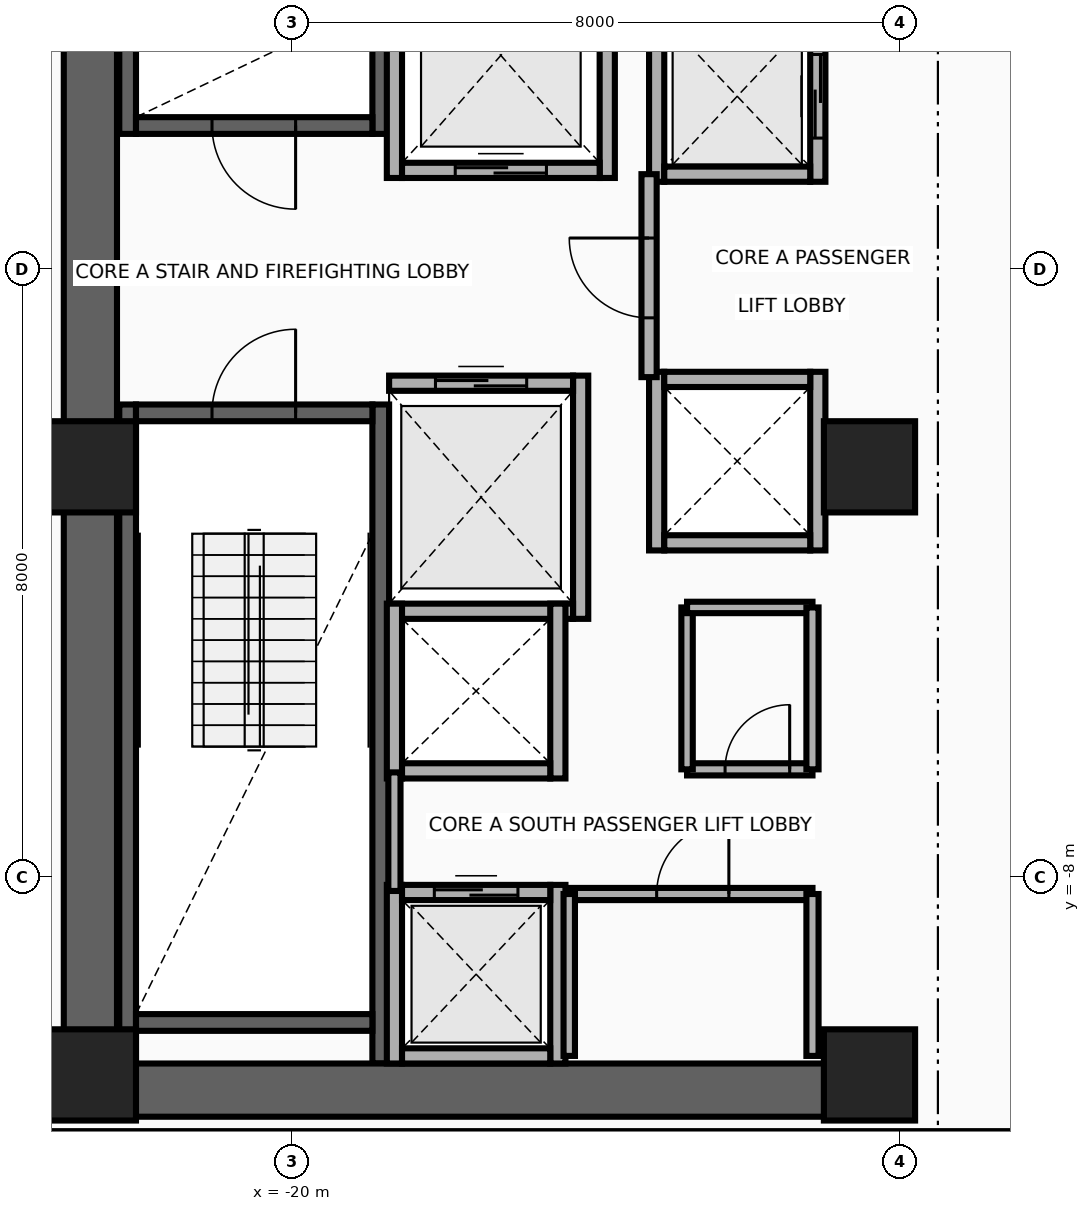
"""IFC4 building model, lengths in metres.
Left out: names, types, materials, properties, quantities, classifications, styles, units other than length and angle.
Written with IfcOpenShell. Run it as: python <this file> out.ifc"""

import sys

from ifc_helpers import new_model, si_unit, direction, frame, frame_2d, origin, origin_2d, place, context, subcontext, project, spatial, rectangle, extrude, source, transform, mapped, element, fill, save


model = new_model("IFC4")
c1 = context("Model", 3, precision=1e-05, world=origin(), true_north=direction((0.0, 1.0)))
c2 = subcontext(c1, "Body", "Model", "MODEL_VIEW")
j1 = project(units=[si_unit("LENGTHUNIT", "METRE"), si_unit("PLANEANGLEUNIT", "RADIAN")], contexts=[c1])
p1 = place(None, origin())
s1 = spatial("IfcSite", under=j1, at=p1, CompositionType="ELEMENT")
p2 = place(p1, origin())
s2 = spatial("IfcBuilding", under=s1, at=p2, CompositionType="ELEMENT")
p3 = place(p2, frame((0.0, 0.0, 150.1)))
s3 = spatial("IfcBuildingStorey", under=s2, at=p3, CompositionType="ELEMENT", Elevation=150.1)
for number, where, z_axis, x_axis in (
    (1, (-22.16, 1.78, 0.0), (0.0, 0.0, 1.0), (0.0, 1.0, 0.0)),
    (2, (-18.83, 1.78, 0.0), (0.0, 0.0, 1.0), (0.0, 1.0, 0.0)),
):
    element("IfcWall", number, at=place(p3, frame(where, z_axis=z_axis, x_axis=x_axis)), inside=s3, PredefinedType="SHEAR", context=c2, shape_type="SweptSolid", body=[
        extrude(rectangle(XDim=8.67, YDim=0.22, at=frame_2d((4.335, 0.0))), origin(), (0.0, 0.0, 1.0), 3.46),
    ])
p4 = place(p3, frame((-22.05, 1.89, 0.0), z_axis=(0.0, 0.0, 1.0), x_axis=(1.0, 0.0, 0.0)))
e3 = element("IfcWall", 3, at=p4, inside=s3, PredefinedType="SHEAR", context=c2, shape_type="SweptSolid", body=[
    extrude(rectangle(XDim=3.11, YDim=0.22, at=frame_2d((1.555, 0.0))), origin(), (0.0, 0.0, 1.0), 3.46),
])
p5 = place(p4, frame((1.0, 0.0, 0.0)))
e4 = element("IfcOpeningElement", 4, at=p5, cuts=e3, PredefinedType="OPENING", context=c2, shape_type="SweptSolid", body=[
    extrude(rectangle(XDim=1.1, YDim=2.15, at=frame_2d((0.55, 1.075))), frame((0.0, 0.125, 0.0), z_axis=(0.0, -1.0, 0.0), x_axis=(1.0, 0.0, 0.0)), (0.0, 0.0, 1.0), 0.25),
])
for number, where, z_axis, x_axis in (
    (5, (-22.16, -10.45, 0.0), (0.0, 0.0, 1.0), (0.0, 1.0, 0.0)),
    (6, (-18.83, -10.45, 0.0), (0.0, 0.0, 1.0), (0.0, 1.0, 0.0)),
):
    element("IfcWall", number, at=place(p3, frame(where, z_axis=z_axis, x_axis=x_axis)), inside=s3, PredefinedType="SHEAR", context=c2, shape_type="SweptSolid", body=[
        extrude(rectangle(XDim=8.67, YDim=0.22, at=frame_2d((4.335, 0.0))), origin(), (0.0, 0.0, 1.0), 3.46),
    ])
p6 = place(p3, frame((-22.05, -9.91, 0.0), z_axis=(0.0, 0.0, 1.0), x_axis=(1.0, 0.0, 0.0)))
e7 = element("IfcWall", 7, at=p6, inside=s3, PredefinedType="SHEAR", context=c2, shape_type="SweptSolid", body=[
    extrude(rectangle(XDim=3.11, YDim=0.22, at=frame_2d((1.555, 0.0))), origin(), (0.0, 0.0, 1.0), 3.46),
])
p7 = place(p3, frame((-22.05, -1.89, 0.0), z_axis=(0.0, 0.0, 1.0), x_axis=(1.0, 0.0, 0.0)))
e8 = element("IfcWall", 8, at=p7, inside=s3, PredefinedType="SHEAR", context=c2, shape_type="SweptSolid", body=[
    extrude(rectangle(XDim=3.11, YDim=0.22, at=frame_2d((1.555, 0.0))), origin(), (0.0, 0.0, 1.0), 3.46),
])
p8 = place(p7, frame((1.0, 0.0, 0.0)))
e9 = element("IfcOpeningElement", 9, at=p8, cuts=e8, PredefinedType="OPENING", context=c2, shape_type="SweptSolid", body=[
    extrude(rectangle(XDim=1.1, YDim=2.15, at=frame_2d((0.55, 1.075))), frame((0.0, 0.125, 0.0), z_axis=(0.0, -1.0, 0.0), x_axis=(1.0, 0.0, 0.0)), (0.0, 0.0, 1.0), 0.25),
])
p9 = place(p3, frame((-22.65, -11.15, 0.0), z_axis=(0.0, 0.0, 1.0), x_axis=(0.0, 1.0, 0.0)))
e10 = element("IfcWall", 10, at=p9, inside=s3, PredefinedType="SHEAR", context=c2, shape_type="SweptSolid", body=[
    extrude(rectangle(XDim=22.3, YDim=0.7, at=frame_2d((11.15, 0.0))), origin(), (0.0, 0.0, 1.0), 3.46),
])
p10 = place(p3, frame((-22.65, -10.8, 0.0), z_axis=(0.0, 0.0, 1.0), x_axis=(1.0, 0.0, 0.0)))
e11 = element("IfcWall", 11, at=p10, inside=s3, PredefinedType="SHEAR", context=c2, shape_type="SweptSolid", body=[
    extrude(rectangle(XDim=10.25, YDim=0.7, at=frame_2d((5.125, 0.0))), origin(), (0.0, 0.0, 1.0), 3.46),
])
m1 = source(origin(), c2, "Body", "SweptSolid", [
    extrude(rectangle(XDim=1.2, YDim=1.2, at=origin_2d()), origin(), (0.0, 0.0, 1.0), 3.7),
])
for number, where, z_axis, x_axis in (
    (12, (-22.65, -10.6, 0.0), (0.0, 0.0, 1.0), (1.0, 0.0, 0.0)),
    (13, (-12.4, -10.6, 0.0), (0.0, 0.0, 1.0), (1.0, 0.0, 0.0)),
    (14, (-22.65, -2.6, 0.0), (0.0, 0.0, 1.0), (1.0, 0.0, 0.0)),
    (15, (-12.4, -2.6, 0.0), (0.0, 0.0, 1.0), (1.0, 0.0, 0.0)),
):
    element("IfcColumn", number, at=place(p3, frame(where, z_axis=z_axis, x_axis=x_axis)), inside=s3, PredefinedType="COLUMN", context=c2, shape_type="MappedRepresentation", body=[
        mapped(m1, transform((0.0, 0.0, 0.0), x_axis=(1.0, 0.0, 0.0), y_axis=(0.0, 1.0, 0.0), z_axis=(0.0, 0.0, 1.0), scale=1.0)),
    ])
for number, where, z_axis, x_axis in (
    (16, (-18.65, 1.2, 0.0), (0.0, 0.0, 1.0), (0.0, 1.0, 0.0)),
    (17, (-15.85, 1.2, 0.0), (0.0, 0.0, 1.0), (0.0, 1.0, 0.0)),
):
    element("IfcWall", number, at=place(p3, frame(where, z_axis=z_axis, x_axis=x_axis)), inside=s3, PredefinedType="MOVABLE", context=c2, shape_type="SweptSolid", body=[
        extrude(rectangle(XDim=3.225, YDim=0.2, at=frame_2d((1.613, 0.0))), origin(), (0.0, 0.0, 1.0), 3.46),
    ])
p11 = place(p3, frame((-18.55, 1.3, 0.0), z_axis=(0.0, 0.0, 1.0), x_axis=(1.0, 0.0, 0.0)))
e18 = element("IfcWall", 18, at=p11, inside=s3, PredefinedType="MOVABLE", context=c2, shape_type="SweptSolid", body=[
    extrude(rectangle(XDim=2.6, YDim=0.2, at=frame_2d((1.3, 0.0))), origin(), (0.0, 0.0, 1.0), 3.46),
])
p12 = place(p11, frame((0.7, 0.0, 0.0)))
e19 = element("IfcOpeningElement", 19, at=p12, cuts=e18, PredefinedType="OPENING", context=c2, shape_type="SweptSolid", body=[
    extrude(rectangle(XDim=1.2, YDim=2.1, at=frame_2d((0.6, 1.05))), frame((0.0, 0.115, 0.0), z_axis=(0.0, -1.0, 0.0), x_axis=(1.0, 0.0, 0.0)), (0.0, 0.0, 1.0), 0.23),
])
p13 = place(p3, frame((-16.2, -4.6, 0.0), z_axis=(0.0, 0.0, 1.0), x_axis=(0.0, 1.0, 0.0)))
e20 = element("IfcWall", 20, at=p13, inside=s3, PredefinedType="MOVABLE", context=c2, shape_type="SweptSolid", body=[
    extrude(rectangle(XDim=3.2, YDim=0.2, at=frame_2d((1.6, 0.0))), origin(), (0.0, 0.0, 1.0), 3.46),
])
p14 = place(p3, frame((-18.72, -4.5, 0.0), z_axis=(0.0, 0.0, 1.0), x_axis=(1.0, 0.0, 0.0)))
e21 = element("IfcWall", 21, at=p14, inside=s3, PredefinedType="MOVABLE", context=c2, shape_type="SweptSolid", body=[
    extrude(rectangle(XDim=2.42, YDim=0.2, at=frame_2d((1.21, 0.0))), origin(), (0.0, 0.0, 1.0), 3.46),
])
p15 = place(p3, frame((-18.72, -1.5, 0.0), z_axis=(0.0, 0.0, 1.0), x_axis=(1.0, 0.0, 0.0)))
e22 = element("IfcWall", 22, at=p15, inside=s3, PredefinedType="MOVABLE", context=c2, shape_type="SweptSolid", body=[
    extrude(rectangle(XDim=2.42, YDim=0.2, at=frame_2d((1.21, 0.0))), origin(), (0.0, 0.0, 1.0), 3.46),
])
p16 = place(p15, frame((0.61, 0.0, 0.0)))
e23 = element("IfcOpeningElement", 23, at=p16, cuts=e22, PredefinedType="OPENING", context=c2, shape_type="SweptSolid", body=[
    extrude(rectangle(XDim=1.2, YDim=2.1, at=frame_2d((0.6, 1.05))), frame((0.0, 0.115, 0.0), z_axis=(0.0, -1.0, 0.0), x_axis=(1.0, 0.0, 0.0)), (0.0, 0.0, 1.0), 0.23),
])
for number, where, z_axis, x_axis in (
    (24, (-18.65, -10.45, 0.0), (0.0, 0.0, 1.0), (0.0, 1.0, 0.0)),
    (25, (-16.5, -10.45, 0.0), (0.0, 0.0, 1.0), (0.0, 1.0, 0.0)),
):
    element("IfcWall", number, at=place(p3, frame(where, z_axis=z_axis, x_axis=x_axis)), inside=s3, PredefinedType="MOVABLE", context=c2, shape_type="SweptSolid", body=[
        extrude(rectangle(XDim=2.35, YDim=0.2, at=frame_2d((1.175, 0.0))), origin(), (0.0, 0.0, 1.0), 2.666),
    ])
p17 = place(p3, frame((-18.55, -10.35, 0.0), z_axis=(0.0, 0.0, 1.0), x_axis=(1.0, 0.0, 0.0)))
e26 = element("IfcWall", 26, at=p17, inside=s3, PredefinedType="MOVABLE", context=c2, shape_type="SweptSolid", body=[
    extrude(rectangle(XDim=1.95, YDim=0.2, at=frame_2d((0.975, 0.0))), origin(), (0.0, 0.0, 1.0), 2.666),
])
p18 = place(p3, frame((-18.55, -8.2, 0.0), z_axis=(0.0, 0.0, 1.0), x_axis=(1.0, 0.0, 0.0)))
e27 = element("IfcWall", 27, at=p18, inside=s3, PredefinedType="MOVABLE", context=c2, shape_type="SweptSolid", body=[
    extrude(rectangle(XDim=1.95, YDim=0.2, at=frame_2d((0.975, 0.0))), origin(), (0.0, 0.0, 1.0), 3.46),
])
p19 = place(p18, frame((0.425, 0.0, 0.0)))
e28 = element("IfcOpeningElement", 28, at=p19, cuts=e27, PredefinedType="OPENING", context=c2, shape_type="SweptSolid", body=[
    extrude(rectangle(XDim=1.1, YDim=2.1, at=frame_2d((0.55, 1.05))), frame((0.0, 0.115, 0.0), z_axis=(0.0, -1.0, 0.0), x_axis=(1.0, 0.0, 0.0)), (0.0, 0.0, 1.0), 0.23),
])
p20 = place(p3, frame((-15.2, 1.15, 0.0), z_axis=(0.0, 0.0, 1.0), x_axis=(0.0, 1.0, 0.0)))
e29 = element("IfcWall", 29, at=p20, inside=s3, PredefinedType="MOVABLE", context=c2, shape_type="SweptSolid", body=[
    extrude(rectangle(XDim=2.25, YDim=0.2, at=frame_2d((1.125, 0.0))), origin(), (0.0, 0.0, 1.0), 3.46),
])
p21 = place(p3, frame((-13.08, 1.15, 0.0), z_axis=(0.0, 0.0, 1.0), x_axis=(0.0, 1.0, 0.0)))
e30 = element("IfcWall", 30, at=p21, inside=s3, PredefinedType="MOVABLE", context=c2, shape_type="SweptSolid", body=[
    extrude(rectangle(XDim=2.25, YDim=0.2, at=frame_2d((1.125, 0.0))), origin(), (0.0, 0.0, 1.0), 3.46),
])
p22 = place(p21, frame((0.575, 0.0, 0.0)))
e31 = element("IfcOpeningElement", 31, at=p22, cuts=e30, PredefinedType="OPENING", context=c2, shape_type="SweptSolid", body=[
    extrude(rectangle(XDim=1.1, YDim=2.1, at=frame_2d((0.55, 1.05))), frame((0.0, 0.115, 0.0), z_axis=(0.0, -1.0, 0.0), x_axis=(1.0, 0.0, 0.0)), (0.0, 0.0, 1.0), 0.23),
])
p23 = place(p3, frame((-15.1, 1.25, 0.0), z_axis=(0.0, 0.0, 1.0), x_axis=(1.0, 0.0, 0.0)))
e32 = element("IfcWall", 32, at=p23, inside=s3, PredefinedType="MOVABLE", context=c2, shape_type="SweptSolid", body=[
    extrude(rectangle(XDim=1.92, YDim=0.2, at=frame_2d((0.96, 0.0))), origin(), (0.0, 0.0, 1.0), 3.46),
])
for number, where, z_axis, x_axis in (
    (33, (-18.65, -6.7, 0.0), (0.0, 0.0, 1.0), (0.0, 1.0, 0.0)),
    (34, (-16.5, -6.7, 0.0), (0.0, 0.0, 1.0), (0.0, 1.0, 0.0)),
):
    element("IfcWall", number, at=place(p3, frame(where, z_axis=z_axis, x_axis=x_axis)), inside=s3, PredefinedType="MOVABLE", context=c2, shape_type="SweptSolid", body=[
        extrude(rectangle(XDim=2.3, YDim=0.2, at=frame_2d((1.15, 0.0))), origin(), (0.0, 0.0, 1.0), 3.46),
    ])
p24 = place(p3, frame((-18.55, -6.6, 0.0), z_axis=(0.0, 0.0, 1.0), x_axis=(1.0, 0.0, 0.0)))
e35 = element("IfcWall", 35, at=p24, inside=s3, PredefinedType="MOVABLE", context=c2, shape_type="SweptSolid", body=[
    extrude(rectangle(XDim=1.95, YDim=0.2, at=frame_2d((0.975, 0.0))), origin(), (0.0, 0.0, 1.0), 3.46),
])
for number, where, z_axis, x_axis in (
    (36, (-15.2, -3.7, 0.0), (0.0, 0.0, 1.0), (0.0, 1.0, 0.0)),
    (37, (-13.08, -3.7, 0.0), (0.0, 0.0, 1.0), (0.0, 1.0, 0.0)),
):
    element("IfcWall", number, at=place(p3, frame(where, z_axis=z_axis, x_axis=x_axis)), inside=s3, PredefinedType="MOVABLE", context=c2, shape_type="SweptSolid", body=[
        extrude(rectangle(XDim=2.35, YDim=0.2, at=frame_2d((1.175, 0.0))), origin(), (0.0, 0.0, 1.0), 3.46),
    ])
for number, where, z_axis, x_axis in (
    (38, (-15.1, -3.6, 0.0), (0.0, 0.0, 1.0), (1.0, 0.0, 0.0)),
    (39, (-15.1, -1.45, 0.0), (0.0, 0.0, 1.0), (1.0, 0.0, 0.0)),
):
    element("IfcWall", number, at=place(p3, frame(where, z_axis=z_axis, x_axis=x_axis)), inside=s3, PredefinedType="MOVABLE", context=c2, shape_type="SweptSolid", body=[
        extrude(rectangle(XDim=1.92, YDim=0.2, at=frame_2d((0.96, 0.0))), origin(), (0.0, 0.0, 1.0), 3.46),
    ])
p25 = place(p3, frame((-15.3, -1.42, 0.0), z_axis=(0.0, 0.0, 1.0), x_axis=(0.0, 1.0, 0.0)))
e40 = element("IfcWall", 40, at=p25, inside=s3, PredefinedType="PARTITIONING", context=c2, shape_type="SweptSolid", body=[
    extrude(rectangle(XDim=2.67, YDim=0.2, at=frame_2d((1.335, 0.0))), origin(), (0.0, 0.0, 1.0), 3.46),
])
p26 = place(p25, frame((0.78, 0.0, 0.0)))
e41 = element("IfcOpeningElement", 41, at=p26, cuts=e40, PredefinedType="OPENING", context=c2, shape_type="SweptSolid", body=[
    extrude(rectangle(XDim=1.05, YDim=2.15, at=frame_2d((0.525, 1.075))), frame((0.0, 0.115, 0.0), z_axis=(0.0, -1.0, 0.0), x_axis=(1.0, 0.0, 0.0)), (0.0, 0.0, 1.0), 0.23),
])
p27 = place(p3, frame((-18.65, -8.18, 0.0), z_axis=(0.0, 0.0, 1.0), x_axis=(0.0, 1.0, 0.0)))
e42 = element("IfcWall", 42, at=p27, inside=s3, PredefinedType="PARTITIONING", context=c2, shape_type="SweptSolid", body=[
    extrude(rectangle(XDim=1.56, YDim=0.16, at=frame_2d((0.78, 0.0))), origin(), (0.0, 0.0, 1.0), 3.46),
])
p28 = place(p3, frame((-16.35, -8.22, 0.0), z_axis=(0.0, 0.0, 1.0), x_axis=(1.0, 0.0, 0.0)))
e43 = element("IfcWall", 43, at=p28, inside=s3, PredefinedType="PARTITIONING", context=c2, shape_type="SweptSolid", body=[
    extrude(rectangle(XDim=3.2, YDim=0.16, at=frame_2d((1.6, 0.0))), origin(), (0.0, 0.0, 1.0), 3.46),
])
p29 = place(p28, frame((1.15, 0.0, 0.0)))
e44 = element("IfcOpeningElement", 44, at=p29, cuts=e43, PredefinedType="OPENING", context=c2, shape_type="SweptSolid", body=[
    extrude(rectangle(XDim=0.95, YDim=2.15, at=frame_2d((0.475, 1.075))), frame((0.0, 0.095, 0.0), z_axis=(0.0, -1.0, 0.0), x_axis=(1.0, 0.0, 0.0)), (0.0, 0.0, 1.0), 0.19),
])
p30 = place(p3, frame((-16.35, -10.35, 0.0), z_axis=(0.0, 0.0, 1.0), x_axis=(0.0, 1.0, 0.0)))
e45 = element("IfcWall", 45, at=p30, inside=s3, PredefinedType="PARTITIONING", context=c2, shape_type="SweptSolid", body=[
    extrude(rectangle(XDim=2.13, YDim=0.15, at=frame_2d((1.065, 0.0))), origin(), (0.0, 0.0, 1.0), 3.46),
])
p31 = place(p3, frame((-13.15, -10.35, 0.0), z_axis=(0.0, 0.0, 1.0), x_axis=(0.0, 1.0, 0.0)))
e46 = element("IfcWall", 46, at=p31, inside=s3, PredefinedType="PARTITIONING", context=c2, shape_type="SweptSolid", body=[
    extrude(rectangle(XDim=2.13, YDim=0.16, at=frame_2d((1.065, 0.0))), origin(), (0.0, 0.0, 1.0), 3.46),
])
p32 = place(p3, frame((-14.8, -6.58, 0.0), z_axis=(0.0, 0.0, 1.0), x_axis=(1.0, 0.0, 0.0)))
e47 = element("IfcWall", 47, at=p32, inside=s3, PredefinedType="PARTITIONING", context=c2, shape_type="SweptSolid", body=[
    extrude(rectangle(XDim=1.65, YDim=0.16, at=frame_2d((0.825, 0.0))), origin(), (0.0, 0.0, 1.0), 3.46),
])
p33 = place(p32, frame((0.5, 0.0, 0.0)))
e48 = element("IfcOpeningElement", 48, at=p33, cuts=e47, PredefinedType="OPENING", context=c2, shape_type="SweptSolid", body=[
    extrude(rectangle(XDim=0.85, YDim=2.05, at=frame_2d((0.425, 1.025))), frame((0.0, 0.095, 0.0), z_axis=(0.0, -1.0, 0.0), x_axis=(1.0, 0.0, 0.0)), (0.0, 0.0, 1.0), 0.19),
])
p34 = place(p3, frame((-14.8, -6.58, 0.0), z_axis=(0.0, 0.0, 1.0), x_axis=(0.0, 1.0, 0.0)))
e49 = element("IfcWall", 49, at=p34, inside=s3, PredefinedType="PARTITIONING", context=c2, shape_type="SweptSolid", body=[
    extrude(rectangle(XDim=2.13, YDim=0.15, at=frame_2d((1.065, 0.0))), origin(), (0.0, 0.0, 1.0), 3.46),
])
p35 = place(p3, frame((-14.8, -4.45, 0.0), z_axis=(0.0, 0.0, 1.0), x_axis=(1.0, 0.0, 0.0)))
e50 = element("IfcWall", 50, at=p35, inside=s3, PredefinedType="PARTITIONING", context=c2, shape_type="SweptSolid", body=[
    extrude(rectangle(XDim=1.65, YDim=0.15, at=frame_2d((0.825, 0.0))), origin(), (0.0, 0.0, 1.0), 3.46),
])
p36 = place(p3, frame((-13.15, -6.58, 0.0), z_axis=(0.0, 0.0, 1.0), x_axis=(0.0, 1.0, 0.0)))
e51 = element("IfcWall", 51, at=p36, inside=s3, PredefinedType="PARTITIONING", context=c2, shape_type="SweptSolid", body=[
    extrude(rectangle(XDim=2.13, YDim=0.16, at=frame_2d((1.065, 0.0))), origin(), (0.0, 0.0, 1.0), 3.46),
])
p37 = place(p3, frame((-23.45, -11.42, 0.0), z_axis=(0.0, 0.0, 1.0), x_axis=(1.0, 0.0, 0.0)))
e52 = element("IfcWall", 52, at=p37, inside=s3, PredefinedType="PARTITIONING", context=c2, shape_type="SweptSolid", body=[
    extrude(rectangle(XDim=13.84, YDim=0.16, at=frame_2d((6.92, 0.0))), origin(), (0.0, 0.0, 1.0), 2.834),
])
p38 = place(p12, origin())
e53 = element("IfcDoor", 53, at=p38, inside=s3, OperationType="DOUBLE_DOOR_SLIDING", PredefinedType="DOOR", context=c2, shape_type="SweptSolid", body=[
    extrude(rectangle(XDim=1.2, YDim=2.1, at=frame_2d((0.6, 1.05))), frame((0.0, 0.025, 0.0), z_axis=(0.0, -1.0, 0.0), x_axis=(1.0, 0.0, 0.0)), (0.0, 0.0, 1.0), 0.05),
])
fill(e19, e53)
p39 = place(p16, origin())
e54 = element("IfcDoor", 54, at=p39, inside=s3, OperationType="DOUBLE_DOOR_SLIDING", PredefinedType="DOOR", context=c2, shape_type="SweptSolid", body=[
    extrude(rectangle(XDim=1.2, YDim=2.1, at=frame_2d((0.6, 1.05))), frame((0.0, 0.025, 0.0), z_axis=(0.0, -1.0, 0.0), x_axis=(1.0, 0.0, 0.0)), (0.0, 0.0, 1.0), 0.05),
])
fill(e23, e54)
p40 = place(p19, origin())
e55 = element("IfcDoor", 55, at=p40, inside=s3, OperationType="DOUBLE_DOOR_SLIDING", PredefinedType="DOOR", context=c2, shape_type="SweptSolid", body=[
    extrude(rectangle(XDim=1.1, YDim=2.1, at=frame_2d((0.55, 1.05))), frame((0.0, 0.025, 0.0), z_axis=(0.0, -1.0, 0.0), x_axis=(1.0, 0.0, 0.0)), (0.0, 0.0, 1.0), 0.05),
])
fill(e28, e55)
p41 = place(p22, origin())
e56 = element("IfcDoor", 56, at=p41, inside=s3, OperationType="DOUBLE_DOOR_SLIDING", PredefinedType="DOOR", context=c2, shape_type="SweptSolid", body=[
    extrude(rectangle(XDim=1.1, YDim=2.1, at=frame_2d((0.55, 1.05))), frame((0.0, 0.025, 0.0), z_axis=(0.0, -1.0, 0.0), x_axis=(1.0, 0.0, 0.0)), (0.0, 0.0, 1.0), 0.05),
])
fill(e31, e56)
p42 = place(p26, origin())
e57 = element("IfcDoor", 57, at=p42, inside=s3, OperationType="SINGLE_SWING_RIGHT", PredefinedType="DOOR", context=c2, shape_type="SweptSolid", body=[
    extrude(rectangle(XDim=1.05, YDim=2.15, at=frame_2d((0.525, 1.075))), frame((0.0, 0.025, 0.0), z_axis=(0.0, -1.0, 0.0), x_axis=(1.0, 0.0, 0.0)), (0.0, 0.0, 1.0), 0.05),
])
fill(e41, e57)
p43 = place(p5, frame((1.1, 0.0, 0.0), z_axis=(0.0, 0.0, 1.0), x_axis=(-1.0, 0.0, 0.0)))
e58 = element("IfcDoor", 58, at=p43, inside=s3, OperationType="SINGLE_SWING_LEFT", PredefinedType="DOOR", context=c2, shape_type="SweptSolid", body=[
    extrude(rectangle(XDim=1.1, YDim=2.15, at=frame_2d((0.55, 1.075))), frame((0.0, 0.025, 0.0), z_axis=(0.0, -1.0, 0.0), x_axis=(1.0, 0.0, 0.0)), (0.0, 0.0, 1.0), 0.05),
])
fill(e4, e58)
p44 = place(p8, origin())
e59 = element("IfcDoor", 59, at=p44, inside=s3, OperationType="SINGLE_SWING_RIGHT", PredefinedType="DOOR", context=c2, shape_type="SweptSolid", body=[
    extrude(rectangle(XDim=1.1, YDim=2.15, at=frame_2d((0.55, 1.075))), frame((0.0, 0.025, 0.0), z_axis=(0.0, -1.0, 0.0), x_axis=(1.0, 0.0, 0.0)), (0.0, 0.0, 1.0), 0.05),
])
fill(e9, e59)
p45 = place(p29, origin())
e60 = element("IfcDoor", 60, at=p45, inside=s3, OperationType="SINGLE_SWING_RIGHT", PredefinedType="DOOR", context=c2, shape_type="SweptSolid", body=[
    extrude(rectangle(XDim=0.95, YDim=2.15, at=frame_2d((0.475, 1.075))), frame((0.0, 0.025, 0.0), z_axis=(0.0, -1.0, 0.0), x_axis=(1.0, 0.0, 0.0)), (0.0, 0.0, 1.0), 0.05),
])
fill(e44, e60)
p46 = place(p33, origin())
e61 = element("IfcDoor", 61, at=p46, inside=s3, OperationType="SINGLE_SWING_LEFT", PredefinedType="DOOR", context=c2, shape_type="SweptSolid", body=[
    extrude(rectangle(XDim=0.85, YDim=2.05, at=frame_2d((0.425, 1.025))), frame((0.0, 0.025, 0.0), z_axis=(0.0, -1.0, 0.0), x_axis=(1.0, 0.0, 0.0)), (0.0, 0.0, 1.0), 0.05),
])
fill(e48, e61)
save(model, sys.argv[1])
